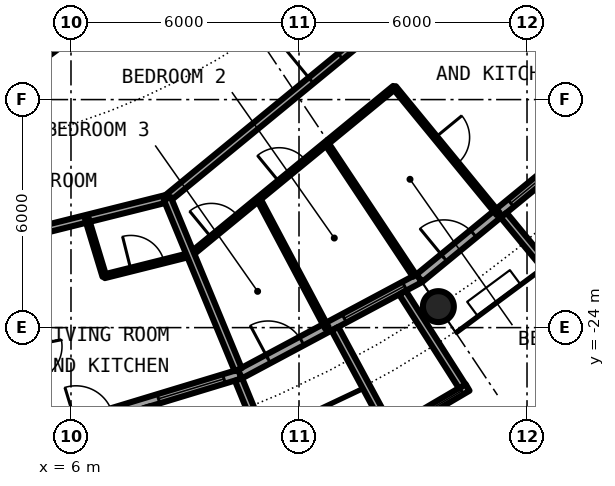
"""IFC4 building model, lengths in metres.
Left out: names, types, materials, properties, quantities, classifications, styles, units other than length and angle.
Written with IfcOpenShell. Run it as: python <this file> out.ifc"""

import sys

from ifc_helpers import new_model, si_unit, direction, frame, frame_2d, origin, origin_2d, place, context, subcontext, project, spatial, rectangle, circle, hollow_circle, extrude, element, fill, save


model = new_model("IFC4")
c1 = context("Model", 3, precision=1e-05, world=origin(), true_north=direction((0.0, 1.0)))
c2 = subcontext(c1, "Body", "Model", "MODEL_VIEW")
j1 = project(units=[si_unit("LENGTHUNIT", "METRE"), si_unit("PLANEANGLEUNIT", "RADIAN")], contexts=[c1])
p1 = place(None, origin())
s1 = spatial("IfcSite", under=j1, at=p1, CompositionType="ELEMENT")
p2 = place(p1, origin())
s2 = spatial("IfcBuilding", under=s1, at=p2, CompositionType="ELEMENT")
p3 = place(p2, frame((0.0, 0.0, 154.35)))
s3 = spatial("IfcBuildingStorey", under=s2, at=p3, CompositionType="ELEMENT", Elevation=154.35)
p4 = place(p3, frame((15.667, -23.448, 0.0), z_axis=(0.0, 0.0, 1.0), x_axis=(1.0, 0.0, 0.0)))
e1 = element("IfcColumn", 1, at=p4, inside=s3, PredefinedType="COLUMN", context=c2, shape_type="SweptSolid", body=[
    extrude(hollow_circle(Radius=0.406, WallThickness=0.04, at=origin_2d()), origin(), (0.0, 0.0, 1.0), 3.05),
])
p5 = place(p3, frame((5.326, -26.775, 0.0), z_axis=(0.0, 0.0, 1.0), x_axis=(0.956965678721, 0.290201119486, 0.0)))
e2 = element("IfcWall", 2, at=p5, inside=s3, PredefinedType="SOLIDWALL", context=c2, shape_type="SweptSolid", body=[
    extrude(rectangle(XDim=5.351, YDim=0.25, at=frame_2d((2.676, 0.0))), origin(), (0.0, 0.0, 1.0), 2.7),
])
p6 = place(p5, frame((0.841, 0.0, 0.0)))
e3 = element("IfcOpeningElement", 3, at=p6, cuts=e2, PredefinedType="OPENING", context=c2, shape_type="SweptSolid", body=[
    extrude(rectangle(XDim=1.0, YDim=2.2, at=frame_2d((0.5, 1.1))), frame((0.0, 0.135, 0.0), z_axis=(0.0, -1.0, 0.0), x_axis=(1.0, 0.0, 0.0)), (0.0, 0.0, 1.0), 0.27),
])
p7 = place(p5, frame((3.111, 0.0, 0.3)))
e4 = element("IfcOpeningElement", 4, at=p7, cuts=e2, PredefinedType="OPENING", context=c2, shape_type="SweptSolid", body=[
    extrude(rectangle(XDim=1.8, YDim=2.1, at=frame_2d((0.9, 1.05))), frame((0.0, 0.135, 0.0), z_axis=(0.0, -1.0, 0.0), x_axis=(1.0, 0.0, 0.0)), (0.0, 0.0, 1.0), 0.27),
])
p8 = place(p3, frame((8.009, -26.092, -0.03), z_axis=(0.0, 0.0, 1.0), x_axis=(0.293406695073, -0.955987715029, 0.0)))
e5 = element("IfcWall", 5, at=p8, inside=s3, PredefinedType="SOLIDWALL", context=c2, shape_type="SweptSolid", body=[
    extrude(rectangle(XDim=3.006, YDim=0.2, at=frame_2d((1.503, 0.0))), origin(), (0.0, 0.0, 1.0), 2.73),
])
p9 = place(p3, frame((10.409, -25.364, -0.03), z_axis=(0.0, 0.0, 1.0), x_axis=(0.379509886562, -0.925187681501, 0.0)))
e6 = element("IfcWall", 6, at=p9, inside=s3, PredefinedType="SOLIDWALL", context=c2, shape_type="SweptSolid", body=[
    extrude(rectangle(XDim=2.883, YDim=0.2, at=frame_2d((1.441, 0.0))), origin(), (0.0, 0.0, 1.0), 2.73),
])
p10 = place(p3, frame((10.447, -25.222, 0.0), z_axis=(0.0, 0.0, 1.0), x_axis=(0.881915646801, 0.471407246368, 0.0)))
e7 = element("IfcWall", 7, at=p10, inside=s3, PredefinedType="SOLIDWALL", context=c2, shape_type="SweptSolid", body=[
    extrude(rectangle(XDim=5.352, YDim=0.25, at=frame_2d((2.676, 0.0))), origin(), (0.0, 0.0, 1.0), 2.7),
])
p11 = place(p10, frame((0.841, 0.0, 0.0)))
e8 = element("IfcOpeningElement", 8, at=p11, cuts=e7, PredefinedType="OPENING", context=c2, shape_type="SweptSolid", body=[
    extrude(rectangle(XDim=1.0, YDim=2.2, at=frame_2d((0.5, 1.1))), frame((0.0, 0.135, 0.0), z_axis=(0.0, -1.0, 0.0), x_axis=(1.0, 0.0, 0.0)), (0.0, 0.0, 1.0), 0.27),
])
p12 = place(p10, frame((3.111, 0.0, 0.3)))
e9 = element("IfcOpeningElement", 9, at=p12, cuts=e7, PredefinedType="OPENING", context=c2, shape_type="SweptSolid", body=[
    extrude(rectangle(XDim=1.8, YDim=2.1, at=frame_2d((0.9, 1.05))), frame((0.0, 0.135, 0.0), z_axis=(0.0, -1.0, 0.0), x_axis=(1.0, 0.0, 0.0)), (0.0, 0.0, 1.0), 0.27),
])
p13 = place(p3, frame((14.327, -26.812, -0.03), z_axis=(0.0, 0.0, 1.0), x_axis=(0.862403467503, 0.506221551535, 0.0)))
e10 = element("IfcWall", 10, at=p13, inside=s3, PredefinedType="SOLIDWALL", context=c2, shape_type="SweptSolid", body=[
    extrude(rectangle(XDim=2.446, YDim=0.2, at=frame_2d((1.223, 0.0))), origin(), (0.0, 0.0, 1.0), 2.73),
])
p14 = place(p13, frame((0.183, 0.0, 0.33)))
e11 = element("IfcOpeningElement", 11, at=p14, cuts=e10, PredefinedType="OPENING", context=c2, shape_type="SweptSolid", body=[
    extrude(circle(Radius=1.04, at=frame_2d((1.04, 1.04))), frame((0.0, 0.11, 0.0), z_axis=(0.0, -1.0, 0.0), x_axis=(1.0, 0.0, 0.0)), (0.0, 0.0, 1.0), 0.22),
])
p15 = place(p3, frame((12.945, -24.029, -0.03), z_axis=(0.0, 0.0, 1.0), x_axis=(0.474424310775, -0.88029629861, 0.0)))
e12 = element("IfcWall", 12, at=p15, inside=s3, PredefinedType="SOLIDWALL", context=c2, shape_type="SweptSolid", body=[
    extrude(rectangle(XDim=3.006, YDim=0.2, at=frame_2d((1.503, 0.0))), origin(), (0.0, 0.0, 1.0), 2.73),
])
p16 = place(p3, frame((14.722, -23.079, -0.03), z_axis=(0.0, 0.0, 1.0), x_axis=(0.537572179146, -0.843217737129, 0.0)))
e13 = element("IfcWall", 13, at=p16, inside=s3, PredefinedType="SOLIDWALL", context=c2, shape_type="SweptSolid", body=[
    extrude(rectangle(XDim=2.924, YDim=0.2, at=frame_2d((1.462, 0.0))), origin(), (0.0, 0.0, 1.0), 2.73),
])
p17 = place(p3, frame((15.167, -22.699, 0.0), z_axis=(0.0, 0.0, 1.0), x_axis=(0.773019449054, 0.634382322723, 0.0)))
e14 = element("IfcWall", 14, at=p17, inside=s3, PredefinedType="SOLIDWALL", context=c2, shape_type="SweptSolid", body=[
    extrude(rectangle(XDim=5.352, YDim=0.25, at=frame_2d((2.676, 0.0))), origin(), (0.0, 0.0, 1.0), 2.7),
])
p18 = place(p17, frame((0.841, 0.0, 0.0)))
e15 = element("IfcOpeningElement", 15, at=p18, cuts=e14, PredefinedType="OPENING", context=c2, shape_type="SweptSolid", body=[
    extrude(rectangle(XDim=1.0, YDim=2.2, at=frame_2d((0.5, 1.1))), frame((0.0, 0.135, 0.0), z_axis=(0.0, -1.0, 0.0), x_axis=(1.0, 0.0, 0.0)), (0.0, 0.0, 1.0), 0.27),
])
p19 = place(p17, frame((3.111, 0.0, 0.3)))
e16 = element("IfcOpeningElement", 16, at=p19, cuts=e14, PredefinedType="OPENING", context=c2, shape_type="SweptSolid", body=[
    extrude(rectangle(XDim=1.8, YDim=2.1, at=frame_2d((0.9, 1.05))), frame((0.0, 0.135, 0.0), z_axis=(0.0, -1.0, 0.0), x_axis=(1.0, 0.0, 0.0)), (0.0, 0.0, 1.0), 0.27),
])
p20 = place(p3, frame((17.384, -21.041, -0.03), z_axis=(0.0, 0.0, 1.0), x_axis=(0.63709551667, -0.770784861449, 0.0)))
e17 = element("IfcWall", 17, at=p20, inside=s3, PredefinedType="SOLIDWALL", context=c2, shape_type="SweptSolid", body=[
    extrude(rectangle(XDim=3.006, YDim=0.2, at=frame_2d((1.503, 0.0))), origin(), (0.0, 0.0, 1.0), 2.73),
])
p21 = place(p3, frame((6.878, -22.649, 0.0), z_axis=(0.0, 0.0, 1.0), x_axis=(0.9700564467, 0.242879579658, 0.0)))
e18 = element("IfcWall", 18, at=p21, inside=s3, PredefinedType="PARTITIONING", context=c2, shape_type="SweptSolid", body=[
    extrude(rectangle(XDim=2.338, YDim=0.1, at=frame_2d((1.169, 0.0))), origin(), (0.0, 0.0, 1.0), 2.7),
])
p22 = place(p21, frame((0.719, 0.0, 0.0)))
e19 = element("IfcOpeningElement", 19, at=p22, cuts=e18, PredefinedType="OPENING", context=c2, shape_type="SweptSolid", body=[
    extrude(rectangle(XDim=0.9, YDim=2.3, at=frame_2d((0.45, 1.15))), frame((0.0, 0.06, 0.0), z_axis=(0.0, -1.0, 0.0), x_axis=(1.0, 0.0, 0.0)), (0.0, 0.0, 1.0), 0.12),
])
p23 = place(p3, frame((9.146, -22.081, 0.0), z_axis=(0.0, 0.0, 1.0), x_axis=(0.772956112865, 0.634459492469, 0.0)))
e20 = element("IfcWall", 20, at=p23, inside=s3, PredefinedType="PARTITIONING", context=c2, shape_type="SweptSolid", body=[
    extrude(rectangle(XDim=6.938, YDim=0.1, at=frame_2d((3.469, 0.0))), origin(), (0.0, 0.0, 1.0), 2.7),
])
p24 = place(p23, frame((3.018, 0.0, 0.0)))
e21 = element("IfcOpeningElement", 21, at=p24, cuts=e20, PredefinedType="OPENING", context=c2, shape_type="SweptSolid", body=[
    extrude(rectangle(XDim=0.9, YDim=2.3, at=frame_2d((0.45, 1.15))), frame((0.0, 0.06, 0.0), z_axis=(0.0, -1.0, 0.0), x_axis=(1.0, 0.0, 0.0)), (0.0, 0.0, 1.0), 0.12),
])
p25 = place(p23, frame((0.709, 0.0, 0.0)))
e22 = element("IfcOpeningElement", 22, at=p25, cuts=e20, PredefinedType="OPENING", context=c2, shape_type="SweptSolid", body=[
    extrude(rectangle(XDim=0.9, YDim=2.3, at=frame_2d((0.45, 1.15))), frame((0.0, 0.06, 0.0), z_axis=(0.0, -1.0, 0.0), x_axis=(1.0, 0.0, 0.0)), (0.0, 0.0, 1.0), 0.12),
])
p26 = place(p3, frame((2.186, -22.193, 0.0), z_axis=(0.0, 0.0, 1.0), x_axis=(0.97003047456, 0.242983288366, 0.0)))
e23 = element("IfcWall", 23, at=p26, inside=s3, PredefinedType="PARTITIONING", context=c2, shape_type="SweptSolid", body=[
    extrude(rectangle(XDim=6.544, YDim=0.2, at=frame_2d((3.272, 0.0))), origin(), (0.0, 0.0, 1.0), 2.7),
])
p27 = place(p26, frame((1.681, 0.0, 0.0)))
e24 = element("IfcOpeningElement", 24, at=p27, cuts=e23, PredefinedType="OPENING", context=c2, shape_type="SweptSolid", body=[
    extrude(rectangle(XDim=1.0, YDim=2.3, at=frame_2d((0.5, 1.15))), frame((0.0, 0.11, 0.0), z_axis=(0.0, -1.0, 0.0), x_axis=(1.0, 0.0, 0.0)), (0.0, 0.0, 1.0), 0.22),
])
p28 = place(p3, frame((8.534, -20.603, 0.0), z_axis=(0.0, 0.0, 1.0), x_axis=(0.772983503654, 0.634426121056, 0.0)))
e25 = element("IfcWall", 25, at=p28, inside=s3, PredefinedType="PARTITIONING", context=c2, shape_type="SweptSolid", body=[
    extrude(rectangle(XDim=12.947, YDim=0.2, at=frame_2d((6.474, 0.0))), origin(), (0.0, 0.0, 1.0), 2.7),
])
p29 = place(p28, frame((4.895, 0.0, 0.0)))
e26 = element("IfcOpeningElement", 26, at=p29, cuts=e25, PredefinedType="OPENING", context=c2, shape_type="SweptSolid", body=[
    extrude(rectangle(XDim=1.0, YDim=2.3, at=frame_2d((0.5, 1.15))), frame((0.0, 0.11, 0.0), z_axis=(0.0, -1.0, 0.0), x_axis=(1.0, 0.0, 0.0)), (0.0, 0.0, 1.0), 0.22),
])
p30 = place(p3, frame((5.137, -16.938, 0.0), z_axis=(0.0, 0.0, 1.0), x_axis=(0.803229232922, 0.595670042371, 0.0)))
e27 = element("IfcWall", 27, at=p30, inside=s3, PredefinedType="PARTITIONING", context=c2, shape_type="SweptSolid", body=[
    extrude(rectangle(XDim=10.224, YDim=0.2, at=frame_2d((5.112, 0.0))), origin(), (0.0, 0.0, 1.0), 2.7),
])
p31 = place(p30, frame((4.612, 0.0, 0.0)))
e28 = element("IfcOpeningElement", 28, at=p31, cuts=e27, PredefinedType="OPENING", context=c2, shape_type="SweptSolid", body=[
    extrude(rectangle(XDim=1.0, YDim=2.3, at=frame_2d((0.5, 1.15))), frame((0.0, 0.11, 0.0), z_axis=(0.0, -1.0, 0.0), x_axis=(1.0, 0.0, 0.0)), (0.0, 0.0, 1.0), 0.22),
])
p32 = place(p3, frame((12.721, -19.147, 0.0), z_axis=(0.0, 0.0, 1.0), x_axis=(0.553609857728, -0.832776155654, 0.0)))
e29 = element("IfcWall", 29, at=p32, inside=s3, PredefinedType="PARTITIONING", context=c2, shape_type="SweptSolid", body=[
    extrude(rectangle(XDim=4.187, YDim=0.1, at=frame_2d((2.094, 0.0))), origin(), (0.0, 0.0, 1.0), 2.7),
])
p33 = place(p3, frame((8.534, -20.603, 0.0), z_axis=(0.0, 0.0, 1.0), x_axis=(0.382651153718, -0.923892902104, 0.0)))
e30 = element("IfcWall", 30, at=p33, inside=s3, PredefinedType="PARTITIONING", context=c2, shape_type="SweptSolid", body=[
    extrude(rectangle(XDim=4.874, YDim=0.2, at=frame_2d((2.437, 0.0))), origin(), (0.0, 0.0, 1.0), 2.7),
])
p34 = place(p3, frame((10.934, -20.614, 0.0), z_axis=(0.0, 0.0, 1.0), x_axis=(0.468594334564, -0.883413464701, 0.0)))
e31 = element("IfcWall", 31, at=p34, inside=s3, PredefinedType="PARTITIONING", context=c2, shape_type="SweptSolid", body=[
    extrude(rectangle(XDim=3.841, YDim=0.1, at=frame_2d((1.92, 0.0))), origin(), (0.0, 0.0, 1.0), 2.7),
])
p35 = place(p3, frame((14.509, -17.679, 0.0), z_axis=(0.0, 0.0, 1.0), x_axis=(0.634342681687, -0.77305197897, 0.0)))
e32 = element("IfcWall", 32, at=p35, inside=s3, PredefinedType="PARTITIONING", context=c2, shape_type="SweptSolid", body=[
    extrude(rectangle(XDim=4.305, YDim=0.1, at=frame_2d((2.153, 0.0))), origin(), (0.0, 0.0, 1.0), 2.7),
])
p36 = place(p35, frame((1.703, 0.0, 0.0)))
e33 = element("IfcOpeningElement", 33, at=p36, cuts=e32, PredefinedType="OPENING", context=c2, shape_type="SweptSolid", body=[
    extrude(rectangle(XDim=0.9, YDim=2.3, at=frame_2d((0.45, 1.15))), frame((0.0, 0.06, 0.0), z_axis=(0.0, -1.0, 0.0), x_axis=(1.0, 0.0, 0.0)), (0.0, 0.0, 1.0), 0.12),
])
p37 = place(p3, frame((6.418, -21.133, 0.0), z_axis=(0.0, 0.0, 1.0), x_axis=(0.290358126892, -0.95691805195, 0.0)))
e34 = element("IfcWall", 34, at=p37, inside=s3, PredefinedType="PARTITIONING", context=c2, shape_type="SweptSolid", body=[
    extrude(rectangle(XDim=1.584, YDim=0.1, at=frame_2d((0.792, 0.0))), origin(), (0.0, 0.0, 1.0), 2.7),
])
p38 = place(p7, origin())
e35 = element("IfcWindow", 35, at=p38, inside=s3, PartitioningType="SINGLE_PANEL", PredefinedType="WINDOW", context=c2, shape_type="SweptSolid", body=[
    extrude(rectangle(XDim=1.8, YDim=2.1, at=frame_2d((0.9, 1.05))), frame((0.0, 0.03, 0.0), z_axis=(0.0, -1.0, 0.0), x_axis=(1.0, 0.0, 0.0)), (0.0, 0.0, 1.0), 0.06),
])
fill(e4, e35)
p39 = place(p11, origin())
e36 = element("IfcDoor", 36, at=p39, inside=s3, OperationType="SINGLE_SWING_LEFT", PredefinedType="DOOR", context=c2, shape_type="SweptSolid", body=[
    extrude(rectangle(XDim=1.0, YDim=2.2, at=frame_2d((0.5, 1.1))), frame((0.0, 0.025, 0.0), z_axis=(0.0, -1.0, 0.0), x_axis=(1.0, 0.0, 0.0)), (0.0, 0.0, 1.0), 0.05),
])
fill(e8, e36)
p40 = place(p12, origin())
e37 = element("IfcWindow", 37, at=p40, inside=s3, PartitioningType="SINGLE_PANEL", PredefinedType="WINDOW", context=c2, shape_type="SweptSolid", body=[
    extrude(rectangle(XDim=1.8, YDim=2.1, at=frame_2d((0.9, 1.05))), frame((0.0, 0.03, 0.0), z_axis=(0.0, -1.0, 0.0), x_axis=(1.0, 0.0, 0.0)), (0.0, 0.0, 1.0), 0.06),
])
fill(e9, e37)
p41 = place(p14, origin())
e38 = element("IfcWindow", 38, at=p41, inside=s3, PartitioningType="SINGLE_PANEL", PredefinedType="WINDOW", context=c2, shape_type="SweptSolid", body=[
    extrude(circle(Radius=1.04, at=frame_2d((1.04, 1.04))), frame((0.0, 0.03, 0.0), z_axis=(0.0, -1.0, 0.0), x_axis=(1.0, 0.0, 0.0)), (0.0, 0.0, 1.0), 0.06),
])
fill(e11, e38)
p42 = place(p18, origin())
e39 = element("IfcDoor", 39, at=p42, inside=s3, OperationType="SINGLE_SWING_LEFT", PredefinedType="DOOR", context=c2, shape_type="SweptSolid", body=[
    extrude(rectangle(XDim=1.0, YDim=2.2, at=frame_2d((0.5, 1.1))), frame((0.0, 0.025, 0.0), z_axis=(0.0, -1.0, 0.0), x_axis=(1.0, 0.0, 0.0)), (0.0, 0.0, 1.0), 0.05),
])
fill(e15, e39)
p43 = place(p19, origin())
e40 = element("IfcWindow", 40, at=p43, inside=s3, PartitioningType="SINGLE_PANEL", PredefinedType="WINDOW", context=c2, shape_type="SweptSolid", body=[
    extrude(rectangle(XDim=1.8, YDim=2.1, at=frame_2d((0.9, 1.05))), frame((0.0, 0.03, 0.0), z_axis=(0.0, -1.0, 0.0), x_axis=(1.0, 0.0, 0.0)), (0.0, 0.0, 1.0), 0.06),
])
fill(e16, e40)
p44 = place(p22, origin())
e41 = element("IfcDoor", 41, at=p44, inside=s3, OperationType="SINGLE_SWING_LEFT", PredefinedType="DOOR", context=c2, shape_type="SweptSolid", body=[
    extrude(rectangle(XDim=0.9, YDim=2.3, at=frame_2d((0.45, 1.15))), frame((0.0, 0.025, 0.0), z_axis=(0.0, -1.0, 0.0), x_axis=(1.0, 0.0, 0.0)), (0.0, 0.0, 1.0), 0.05),
])
fill(e19, e41)
p45 = place(p29, origin())
e42 = element("IfcDoor", 42, at=p45, inside=s3, OperationType="SINGLE_SWING_LEFT", PredefinedType="DOOR", context=c2, shape_type="SweptSolid", body=[
    extrude(rectangle(XDim=1.0, YDim=2.3, at=frame_2d((0.5, 1.15))), frame((0.0, 0.025, 0.0), z_axis=(0.0, -1.0, 0.0), x_axis=(1.0, 0.0, 0.0)), (0.0, 0.0, 1.0), 0.05),
])
fill(e26, e42)
p46 = place(p36, origin())
e43 = element("IfcDoor", 43, at=p46, inside=s3, OperationType="SINGLE_SWING_RIGHT", PredefinedType="DOOR", context=c2, shape_type="SweptSolid", body=[
    extrude(rectangle(XDim=0.9, YDim=2.3, at=frame_2d((0.45, 1.15))), frame((0.0, 0.025, 0.0), z_axis=(0.0, -1.0, 0.0), x_axis=(1.0, 0.0, 0.0)), (0.0, 0.0, 1.0), 0.05),
])
fill(e33, e43)
p47 = place(p24, origin())
e44 = element("IfcDoor", 44, at=p47, inside=s3, OperationType="SINGLE_SWING_LEFT", PredefinedType="DOOR", context=c2, shape_type="SweptSolid", body=[
    extrude(rectangle(XDim=0.9, YDim=2.3, at=frame_2d((0.45, 1.15))), frame((0.0, 0.025, 0.0), z_axis=(0.0, -1.0, 0.0), x_axis=(1.0, 0.0, 0.0)), (0.0, 0.0, 1.0), 0.05),
])
fill(e21, e44)
p48 = place(p25, origin())
e45 = element("IfcDoor", 45, at=p48, inside=s3, OperationType="SINGLE_SWING_LEFT", PredefinedType="DOOR", context=c2, shape_type="SweptSolid", body=[
    extrude(rectangle(XDim=0.9, YDim=2.3, at=frame_2d((0.45, 1.15))), frame((0.0, 0.025, 0.0), z_axis=(0.0, -1.0, 0.0), x_axis=(1.0, 0.0, 0.0)), (0.0, 0.0, 1.0), 0.05),
])
fill(e22, e45)
save(model, sys.argv[1])
